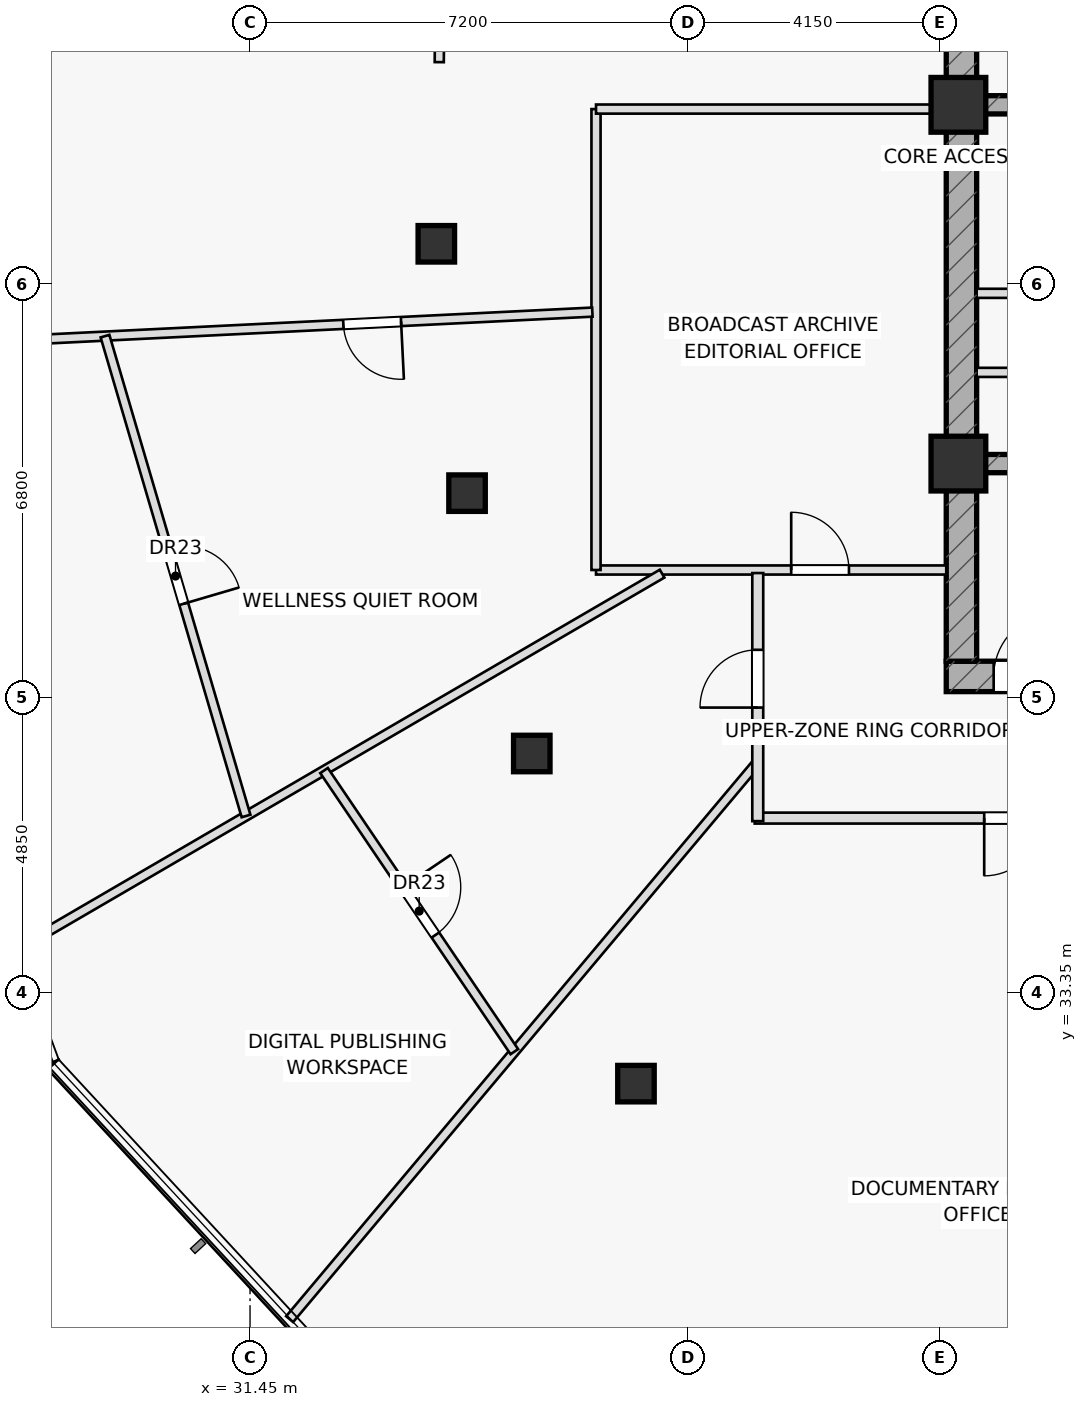
"""IFC4 building model, lengths in metres.
Left out: names, types, materials, properties, quantities, classifications, styles, units other than length and angle.
Written with IfcOpenShell. Run it as: python <this file> out.ifc"""

import sys

from ifc_helpers import new_model, si_unit, direction, frame, frame_2d, origin, origin_2d, place, context, subcontext, project, spatial, rectangle, hollow_rectangle, extrude, element, fill, save


model = new_model("IFC4")
c1 = context("Model", 3, precision=1e-05, world=origin(), true_north=direction((0.0, 1.0)))
c2 = subcontext(c1, "Body", "Model", "MODEL_VIEW")
j1 = project(units=[si_unit("LENGTHUNIT", "METRE"), si_unit("PLANEANGLEUNIT", "RADIAN")], contexts=[c1])
p1 = place(None, origin())
s1 = spatial("IfcSite", under=j1, at=p1, CompositionType="ELEMENT")
p2 = place(p1, origin())
s2 = spatial("IfcBuilding", under=s1, at=p2, CompositionType="ELEMENT")
p3 = place(p2, frame((0.0, 0.0, 237.95)))
s3 = spatial("IfcBuildingStorey", under=s2, at=p3, CompositionType="ELEMENT", Elevation=237.95)
p4 = place(p3, frame((42.9, 38.55, 0.0), z_axis=(0.0, 0.0, 1.0), x_axis=(1.0, 0.0, 0.0)))
e1 = element("IfcWall", 1, at=p4, inside=s3, PredefinedType="SHEAR", context=c2, shape_type="SweptSolid", body=[
    extrude(rectangle(XDim=14.2, YDim=0.5, at=frame_2d((7.1, 0.0))), origin(), (0.0, 0.0, 1.0), 3.65),
])
p5 = place(p4, frame((0.78, 0.0, 0.0)))
e2 = element("IfcOpeningElement", 2, at=p5, cuts=e1, PredefinedType="OPENING", context=c2, shape_type="SweptSolid", body=[
    extrude(rectangle(XDim=1.05, YDim=2.2, at=frame_2d((0.525, 1.1))), frame((0.0, 0.26, 0.0), z_axis=(0.0, -1.0, 0.0), x_axis=(1.0, 0.0, 0.0)), (0.0, 0.0, 1.0), 0.52),
])
p6 = place(p3, frame((43.15, 38.8, 0.0), z_axis=(0.0, 0.0, 1.0), x_axis=(0.0, 1.0, 0.0)))
e3 = element("IfcWall", 3, at=p6, inside=s3, PredefinedType="SHEAR", context=c2, shape_type="SweptSolid", body=[
    extrude(rectangle(XDim=12.4, YDim=0.5, at=frame_2d((6.2, 0.0))), origin(), (0.0, 0.0, 1.0), 3.65),
])
p7 = place(p3, frame((43.4, 47.95, 0.0), z_axis=(0.0, 0.0, 1.0), x_axis=(1.0, 0.0, 0.0)))
e4 = element("IfcWall", 4, at=p7, inside=s3, PredefinedType="SHEAR", context=c2, shape_type="SweptSolid", body=[
    extrude(rectangle(XDim=13.2, YDim=0.3, at=frame_2d((6.6, 0.0))), origin(), (0.0, 0.0, 1.0), 3.65),
])
p8 = place(p7, frame((8.345, 0.0, 0.0)))
e5 = element("IfcOpeningElement", 5, at=p8, cuts=e4, PredefinedType="OPENING", context=c2, shape_type="SweptSolid", body=[
    extrude(rectangle(XDim=1.15, YDim=2.2, at=frame_2d((0.575, 1.1))), frame((0.0, 0.16, 0.0), z_axis=(0.0, -1.0, 0.0), x_axis=(1.0, 0.0, 0.0)), (0.0, 0.0, 1.0), 0.32),
])
p9 = place(p7, frame((10.065, 0.0, 0.0)))
e6 = element("IfcOpeningElement", 6, at=p9, cuts=e4, PredefinedType="OPENING", context=c2, shape_type="SweptSolid", body=[
    extrude(rectangle(XDim=1.15, YDim=2.2, at=frame_2d((0.575, 1.1))), frame((0.0, 0.16, 0.0), z_axis=(0.0, -1.0, 0.0), x_axis=(1.0, 0.0, 0.0)), (0.0, 0.0, 1.0), 0.32),
])
p10 = place(p7, frame((11.645, 0.0, 0.0)))
e7 = element("IfcOpeningElement", 7, at=p10, cuts=e4, PredefinedType="OPENING", context=c2, shape_type="SweptSolid", body=[
    extrude(rectangle(XDim=1.15, YDim=2.2, at=frame_2d((0.575, 1.1))), frame((0.0, 0.16, 0.0), z_axis=(0.0, -1.0, 0.0), x_axis=(1.0, 0.0, 0.0)), (0.0, 0.0, 1.0), 0.32),
])
p11 = place(p3, frame((43.4, 42.05, 0.0), z_axis=(0.0, 0.0, 1.0), x_axis=(1.0, 0.0, 0.0)))
e8 = element("IfcWall", 8, at=p11, inside=s3, PredefinedType="SHEAR", context=c2, shape_type="SweptSolid", body=[
    extrude(rectangle(XDim=13.2, YDim=0.3, at=frame_2d((6.6, 0.0))), origin(), (0.0, 0.0, 1.0), 3.65),
])
p12 = place(p11, frame((7.45, 0.0, 0.0)))
e9 = element("IfcOpeningElement", 9, at=p12, cuts=e8, PredefinedType="OPENING", context=c2, shape_type="SweptSolid", body=[
    extrude(rectangle(XDim=0.85, YDim=2.05, at=frame_2d((0.425, 1.025))), frame((0.0, 0.16, 0.0), z_axis=(0.0, -1.0, 0.0), x_axis=(1.0, 0.0, 0.0)), (0.0, 0.0, 1.0), 0.32),
])
p13 = place(p11, frame((9.5, 0.0, 0.0)))
e10 = element("IfcOpeningElement", 10, at=p13, cuts=e8, PredefinedType="OPENING", context=c2, shape_type="SweptSolid", body=[
    extrude(rectangle(XDim=0.85, YDim=2.05, at=frame_2d((0.425, 1.025))), frame((0.0, 0.16, 0.0), z_axis=(0.0, -1.0, 0.0), x_axis=(1.0, 0.0, 0.0)), (0.0, 0.0, 1.0), 0.32),
])
p14 = place(p11, frame((11.6, 0.0, 0.0)))
e11 = element("IfcOpeningElement", 11, at=p14, cuts=e8, PredefinedType="OPENING", context=c2, shape_type="SweptSolid", body=[
    extrude(rectangle(XDim=0.85, YDim=2.05, at=frame_2d((0.425, 1.025))), frame((0.0, 0.16, 0.0), z_axis=(0.0, -1.0, 0.0), x_axis=(1.0, 0.0, 0.0)), (0.0, 0.0, 1.0), 0.32),
])
for number, where, z_axis, x_axis in (
    (12, (43.1, 47.95, 0.0), (0.0, 0.0, 1.0), (1.0, 0.0, 0.0)),
    (13, (43.1, 42.05, 0.0), (0.0, 0.0, 1.0), (1.0, 0.0, 0.0)),
):
    element("IfcColumn", number, at=place(p3, frame(where, z_axis=z_axis, x_axis=x_axis)), inside=s3, PredefinedType="COLUMN", context=c2, shape_type="SweptSolid", body=[
        extrude(rectangle(XDim=0.9, YDim=0.9, at=origin_2d()), origin(), (0.0, 0.0, 1.0), 3.65),
    ])
for number, where, z_axis, x_axis in (
    (14, (34.514, 45.665, 0.0), (0.0, 0.0, 1.0), (1.0, 0.0, 0.0)),
    (15, (35.019, 41.564, 0.0), (0.0, 0.0, 1.0), (1.0, 0.0, 0.0)),
    (16, (36.083, 37.282, 0.0), (0.0, 0.0, 1.0), (1.0, 0.0, 0.0)),
    (17, (37.797, 31.853, 0.0), (0.0, 0.0, 1.0), (1.0, 0.0, 0.0)),
):
    element("IfcColumn", number, at=place(p3, frame(where, z_axis=z_axis, x_axis=x_axis)), inside=s3, PredefinedType="COLUMN", context=c2, shape_type="SweptSolid", body=[
        extrude(hollow_rectangle(XDim=0.6, YDim=0.6, WallThickness=0.036, at=origin_2d()), origin(), (0.0, 0.0, 1.0), 3.65),
    ])
for number, where, z_axis, x_axis in (
    (18, (43.4, 43.55, 0.0), (0.0, 0.0, 1.0), (1.0, 0.0, 0.0)),
    (19, (43.4, 44.85, 0.0), (0.0, 0.0, 1.0), (1.0, 0.0, 0.0)),
):
    element("IfcWall", number, at=place(p3, frame(where, z_axis=z_axis, x_axis=x_axis)), inside=s3, PredefinedType="PARTITIONING", context=c2, shape_type="SweptSolid", body=[
        extrude(rectangle(XDim=2.35, YDim=0.15, at=frame_2d((1.175, 0.0))), origin(), (0.0, 0.0, 1.0), 3.65),
    ])
p15 = place(p3, frame((34.652, 58.056, 0.0), z_axis=(0.0, 0.0, 1.0), x_axis=(-0.009553538759, -0.999954363907, 0.0)))
e20 = element("IfcWall", 20, at=p15, inside=s3, PredefinedType="PARTITIONING", context=c2, shape_type="SweptSolid", body=[
    extrude(rectangle(XDim=9.404, YDim=0.15, at=frame_2d((4.702, 0.0))), origin(), (0.0, 0.0, 1.0), 3.135),
])
p16 = place(p3, frame((37.14, 40.3, 0.0), z_axis=(0.0, 0.0, 1.0), x_axis=(1.0, 0.0, 0.0)))
e21 = element("IfcWall", 21, at=p16, inside=s3, PredefinedType="PARTITIONING", context=c2, shape_type="SweptSolid", body=[
    extrude(rectangle(XDim=5.76, YDim=0.15, at=frame_2d((2.88, 0.0))), origin(), (0.0, 0.0, 1.0), 3.025),
])
p17 = place(p16, frame((3.21, 0.0, 0.0)))
e22 = element("IfcOpeningElement", 22, at=p17, cuts=e21, PredefinedType="OPENING", context=c2, shape_type="SweptSolid", body=[
    extrude(rectangle(XDim=0.95, YDim=2.05, at=frame_2d((0.475, 1.025))), frame((0.0, 0.085, 0.0), z_axis=(0.0, -1.0, 0.0), x_axis=(1.0, 0.0, 0.0)), (0.0, 0.0, 1.0), 0.17),
])
p18 = place(p3, frame((37.14, 40.3, 0.0), z_axis=(0.0, 0.0, 1.0), x_axis=(0.0, 1.0, 0.0)))
e23 = element("IfcWall", 23, at=p18, inside=s3, PredefinedType="PARTITIONING", context=c2, shape_type="SweptSolid", body=[
    extrude(rectangle(XDim=7.58, YDim=0.15, at=frame_2d((3.79, 0.0))), origin(), (0.0, 0.0, 1.0), 3.65),
])
p19 = place(p3, frame((37.14, 47.88, 0.0), z_axis=(0.0, 0.0, 1.0), x_axis=(1.0, 0.0, 0.0)))
e24 = element("IfcWall", 24, at=p19, inside=s3, PredefinedType="PARTITIONING", context=c2, shape_type="SweptSolid", body=[
    extrude(rectangle(XDim=5.76, YDim=0.15, at=frame_2d((2.88, 0.0))), origin(), (0.0, 0.0, 1.0), 3.025),
])
p20 = place(p3, frame((37.08, 44.541, 0.0), z_axis=(0.0, 0.0, 1.0), x_axis=(-0.998789781413, -0.049183051404, 0.0)))
e25 = element("IfcWall", 25, at=p20, inside=s3, PredefinedType="PARTITIONING", context=c2, shape_type="SweptSolid", body=[
    extrude(rectangle(XDim=12.539, YDim=0.15, at=frame_2d((6.27, 0.0))), origin(), (0.0, 0.0, 1.0), 3.135),
])
p21 = place(p20, frame((3.15, 0.0, 0.0)))
e26 = element("IfcOpeningElement", 26, at=p21, cuts=e25, PredefinedType="OPENING", context=c2, shape_type="SweptSolid", body=[
    extrude(rectangle(XDim=0.95, YDim=2.05, at=frame_2d((0.475, 1.025))), frame((0.0, 0.085, 0.0), z_axis=(0.0, -1.0, 0.0), x_axis=(1.0, 0.0, 0.0)), (0.0, 0.0, 1.0), 0.17),
])
p22 = place(p3, frame((38.227, 40.24, 0.0), z_axis=(0.0, 0.0, 1.0), x_axis=(-0.864126503229, -0.503274662999, 0.0)))
e27 = element("IfcWall", 27, at=p22, inside=s3, PredefinedType="PARTITIONING", context=c2, shape_type="SweptSolid", body=[
    extrude(rectangle(XDim=12.373, YDim=0.15, at=frame_2d((6.187, 0.0))), origin(), (0.0, 0.0, 1.0), 3.135),
])
p23 = place(p3, frame((39.8, 37.144, 0.0), z_axis=(0.0, 0.0, 1.0), x_axis=(-0.64325714608, -0.765650209963, 0.0)))
e28 = element("IfcWall", 28, at=p23, inside=s3, PredefinedType="PARTITIONING", context=c2, shape_type="SweptSolid", body=[
    extrude(rectangle(XDim=11.968, YDim=0.15, at=frame_2d((5.984, 0.0))), origin(), (0.0, 0.0, 1.0), 3.135),
])
p24 = place(p3, frame((29.065, 44.146, 0.0), z_axis=(0.0, 0.0, 1.0), x_axis=(0.281946161772, -0.95943022772, 0.0)))
e29 = element("IfcWall", 29, at=p24, inside=s3, PredefinedType="PARTITIONING", context=c2, shape_type="SweptSolid", body=[
    extrude(rectangle(XDim=8.225, YDim=0.15, at=frame_2d((4.113, 0.0))), origin(), (0.0, 0.0, 1.0), 3.65),
])
p25 = place(p24, frame((3.638, 0.0, 0.0)))
e30 = element("IfcOpeningElement", 30, at=p25, cuts=e29, PredefinedType="OPENING", context=c2, shape_type="SweptSolid", body=[
    extrude(rectangle(XDim=0.95, YDim=2.05, at=frame_2d((0.475, 1.025))), frame((0.0, 0.085, 0.0), z_axis=(0.0, -1.0, 0.0), x_axis=(1.0, 0.0, 0.0)), (0.0, 0.0, 1.0), 0.17),
])
p26 = place(p3, frame((32.667, 37.002, 0.0), z_axis=(0.0, 0.0, 1.0), x_axis=(0.560589941765, -0.828093543745, 0.0)))
e31 = element("IfcWall", 31, at=p26, inside=s3, PredefinedType="PARTITIONING", context=c2, shape_type="SweptSolid", body=[
    extrude(rectangle(XDim=5.583, YDim=0.15, at=frame_2d((2.792, 0.0))), origin(), (0.0, 0.0, 1.0), 3.65),
])
p27 = place(p26, frame((2.316, 0.0, 0.0)))
e32 = element("IfcOpeningElement", 32, at=p27, cuts=e31, PredefinedType="OPENING", context=c2, shape_type="SweptSolid", body=[
    extrude(rectangle(XDim=0.95, YDim=2.05, at=frame_2d((0.475, 1.025))), frame((0.0, 0.085, 0.0), z_axis=(0.0, -1.0, 0.0), x_axis=(1.0, 0.0, 0.0)), (0.0, 0.0, 1.0), 0.17),
])
p28 = place(p3, frame((59.23, 36.22, 0.0), z_axis=(0.0, 0.0, 1.0), x_axis=(-1.0, 0.0, 0.0)))
e33 = element("IfcWall", 33, at=p28, inside=s3, PredefinedType="PARTITIONING", context=c2, shape_type="SweptSolid", body=[
    extrude(rectangle(XDim=19.48, YDim=0.18, at=frame_2d((9.74, 0.0))), origin(), (0.0, 0.0, 1.0), 3.025),
])
p29 = place(p28, frame((3.378, 0.0, 0.0)))
e34 = element("IfcOpeningElement", 34, at=p29, cuts=e33, PredefinedType="OPENING", context=c2, shape_type="SweptSolid", body=[
    extrude(rectangle(XDim=0.95, YDim=2.05, at=frame_2d((0.475, 1.025))), frame((0.0, 0.1, 0.0), z_axis=(0.0, -1.0, 0.0), x_axis=(1.0, 0.0, 0.0)), (0.0, 0.0, 1.0), 0.2),
])
p30 = place(p28, frame((8.88, 0.0, 0.0)))
e35 = element("IfcOpeningElement", 35, at=p30, cuts=e33, PredefinedType="OPENING", context=c2, shape_type="SweptSolid", body=[
    extrude(rectangle(XDim=0.95, YDim=2.05, at=frame_2d((0.475, 1.025))), frame((0.0, 0.1, 0.0), z_axis=(0.0, -1.0, 0.0), x_axis=(1.0, 0.0, 0.0)), (0.0, 0.0, 1.0), 0.2),
])
p31 = place(p28, frame((14.756, 0.0, 0.0)))
e36 = element("IfcOpeningElement", 36, at=p31, cuts=e33, PredefinedType="OPENING", context=c2, shape_type="SweptSolid", body=[
    extrude(rectangle(XDim=0.95, YDim=2.05, at=frame_2d((0.475, 1.025))), frame((0.0, 0.1, 0.0), z_axis=(0.0, -1.0, 0.0), x_axis=(1.0, 0.0, 0.0)), (0.0, 0.0, 1.0), 0.2),
])
p32 = place(p3, frame((39.8, 36.17, 0.0), z_axis=(0.0, 0.0, 1.0), x_axis=(0.0, 1.0, 0.0)))
e37 = element("IfcWall", 37, at=p32, inside=s3, PredefinedType="PARTITIONING", context=c2, shape_type="SweptSolid", body=[
    extrude(rectangle(XDim=4.08, YDim=0.18, at=frame_2d((2.04, 0.0))), origin(), (0.0, 0.0, 1.0), 3.325),
])
p33 = place(p32, frame((1.868, 0.0, 0.0)))
e38 = element("IfcOpeningElement", 38, at=p33, cuts=e37, PredefinedType="OPENING", context=c2, shape_type="SweptSolid", body=[
    extrude(rectangle(XDim=0.95, YDim=2.05, at=frame_2d((0.475, 1.025))), frame((0.0, 0.1, 0.0), z_axis=(0.0, -1.0, 0.0), x_axis=(1.0, 0.0, 0.0)), (0.0, 0.0, 1.0), 0.2),
])
p34 = place(p5, origin())
e39 = element("IfcDoor", 39, at=p34, inside=s3, OperationType="SINGLE_SWING_RIGHT", PredefinedType="DOOR", context=c2, shape_type="SweptSolid", body=[
    extrude(rectangle(XDim=1.05, YDim=2.2, at=frame_2d((0.525, 1.1))), frame((0.0, 0.025, 0.0), z_axis=(0.0, -1.0, 0.0), x_axis=(1.0, 0.0, 0.0)), (0.0, 0.0, 1.0), 0.05),
])
fill(e2, e39)
p35 = place(p17, origin())
e40 = element("IfcDoor", 40, at=p35, inside=s3, OperationType="SINGLE_SWING_LEFT", PredefinedType="DOOR", context=c2, shape_type="SweptSolid", body=[
    extrude(rectangle(XDim=0.95, YDim=2.05, at=frame_2d((0.475, 1.025))), frame((0.0, 0.025, 0.0), z_axis=(0.0, -1.0, 0.0), x_axis=(1.0, 0.0, 0.0)), (0.0, 0.0, 1.0), 0.05),
])
fill(e22, e40)
p36 = place(p21, origin())
e41 = element("IfcDoor", 41, at=p36, inside=s3, OperationType="SINGLE_SWING_LEFT", PredefinedType="DOOR", context=c2, shape_type="SweptSolid", body=[
    extrude(rectangle(XDim=0.95, YDim=2.05, at=frame_2d((0.475, 1.025))), frame((0.0, 0.025, 0.0), z_axis=(0.0, -1.0, 0.0), x_axis=(1.0, 0.0, 0.0)), (0.0, 0.0, 1.0), 0.05),
])
fill(e26, e41)
p37 = place(p25, origin())
e42 = element("IfcDoor", 42, at=p37, inside=s3, OperationType="SINGLE_SWING_RIGHT", PredefinedType="DOOR", context=c2, shape_type="SweptSolid", body=[
    extrude(rectangle(XDim=0.95, YDim=2.05, at=frame_2d((0.475, 1.025))), frame((0.0, 0.025, 0.0), z_axis=(0.0, -1.0, 0.0), x_axis=(1.0, 0.0, 0.0)), (0.0, 0.0, 1.0), 0.05),
])
fill(e30, e42)
p38 = place(p27, origin())
e43 = element("IfcDoor", 43, at=p38, inside=s3, OperationType="SINGLE_SWING_LEFT", PredefinedType="DOOR", context=c2, shape_type="SweptSolid", body=[
    extrude(rectangle(XDim=0.95, YDim=2.05, at=frame_2d((0.475, 1.025))), frame((0.0, 0.025, 0.0), z_axis=(0.0, -1.0, 0.0), x_axis=(1.0, 0.0, 0.0)), (0.0, 0.0, 1.0), 0.05),
])
fill(e32, e43)
p39 = place(p31, origin())
e44 = element("IfcDoor", 44, at=p39, inside=s3, OperationType="SINGLE_SWING_RIGHT", PredefinedType="DOOR", context=c2, shape_type="SweptSolid", body=[
    extrude(rectangle(XDim=0.95, YDim=2.05, at=frame_2d((0.475, 1.025))), frame((0.0, 0.025, 0.0), z_axis=(0.0, -1.0, 0.0), x_axis=(1.0, 0.0, 0.0)), (0.0, 0.0, 1.0), 0.05),
])
fill(e36, e44)
p40 = place(p33, origin())
e45 = element("IfcDoor", 45, at=p40, inside=s3, OperationType="SINGLE_SWING_LEFT", PredefinedType="DOOR", context=c2, shape_type="SweptSolid", body=[
    extrude(rectangle(XDim=0.95, YDim=2.05, at=frame_2d((0.475, 1.025))), frame((0.0, 0.025, 0.0), z_axis=(0.0, -1.0, 0.0), x_axis=(1.0, 0.0, 0.0)), (0.0, 0.0, 1.0), 0.05),
])
fill(e38, e45)
save(model, sys.argv[1])
